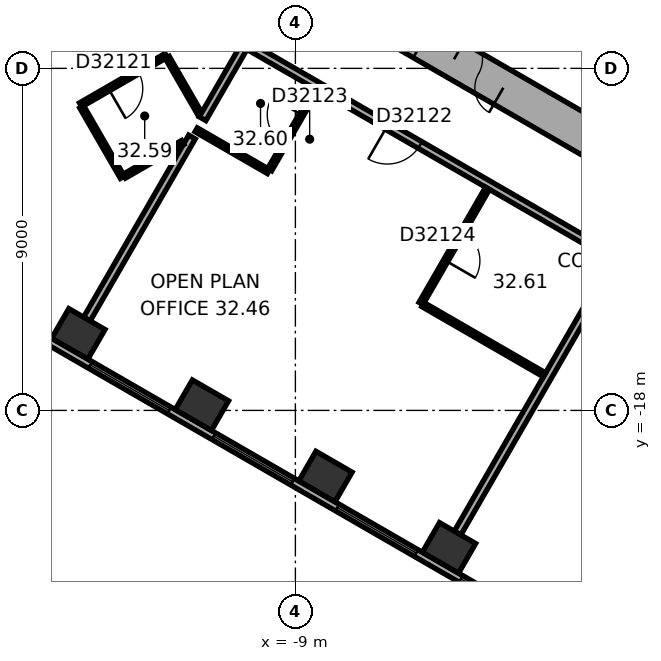
"""IFC4 building model, lengths in metres.
Left out: names, types, materials, properties, quantities, classifications, styles, units other than length and angle.
Written with IfcOpenShell. Run it as: python <this file> out.ifc"""

import sys

from ifc_helpers import new_model, si_unit, direction, frame, frame_2d, origin, origin_2d, place, context, subcontext, project, spatial, rectangle, extrude, element, fill, save


model = new_model("IFC4")
c1 = context("Model", 3, precision=1e-05, world=origin(), true_north=direction((0.0, 1.0)))
c2 = subcontext(c1, "Body", "Model", "MODEL_VIEW")
j1 = project(units=[si_unit("LENGTHUNIT", "METRE"), si_unit("PLANEANGLEUNIT", "RADIAN")], contexts=[c1])
p1 = place(None, origin())
s1 = spatial("IfcSite", under=j1, at=p1, CompositionType="ELEMENT")
p2 = place(p1, origin())
s2 = spatial("IfcBuilding", under=s1, at=p2, CompositionType="ELEMENT")
p3 = place(p2, frame((0.0, 0.0, 131.8)))
s3 = spatial("IfcBuildingStorey", under=s2, at=p3, CompositionType="ELEMENT", Elevation=131.8)
for number, where, z_axis, x_axis in (
    (1, (-14.711, -15.986, 0.0), (0.0, 0.0, 1.0), (0.866, -0.5, 0.0)),
    (2, (-11.46, -17.863, 0.0), (0.0, 0.0, 1.0), (0.866, -0.5, 0.0)),
    (3, (-8.208, -19.74, 0.0), (0.0, 0.0, 1.0), (0.866, -0.5, 0.0)),
    (4, (-4.958, -21.617, 0.0), (0.0, 0.0, 1.0), (0.866, -0.5, 0.0)),
):
    element("IfcColumn", number, at=place(p3, frame(where, z_axis=z_axis, x_axis=x_axis)), inside=s3, PredefinedType="COLUMN", context=c2, shape_type="SweptSolid", body=[
        extrude(rectangle(XDim=1.1, YDim=0.9, at=origin_2d()), origin(), (0.0, 0.0, 1.0), 3.7),
    ])
p4 = place(p3, frame((-10.25, -5.629, 0.0), z_axis=(0.0, 0.0, 1.0), x_axis=(0.866022616891, -0.50000482701, 0.0)))
e5 = element("IfcWall", 5, at=p4, inside=s3, PredefinedType="SHEAR", context=c2, shape_type="SweptSolid", body=[
    extrude(rectangle(XDim=12.125, YDim=1.0, at=frame_2d((6.062, 0.0))), origin(), (0.0, 0.0, 1.0), 3.7),
])
p5 = place(p4, frame((6.262, 0.0, 0.0)))
e6 = element("IfcOpeningElement", 6, at=p5, cuts=e5, PredefinedType="OPENING", context=c2, shape_type="SweptSolid", body=[
    extrude(rectangle(XDim=1.5, YDim=2.1, at=frame_2d((0.75, 1.05))), frame((0.0, 0.51, 0.0), z_axis=(0.0, -1.0, 0.0), x_axis=(1.0, 0.0, 0.0)), (0.0, 0.0, 1.0), 1.02),
])
p6 = place(p4, frame((1.812, 0.0, 0.0)))
e7 = element("IfcOpeningElement", 7, at=p6, cuts=e5, PredefinedType="OPENING", context=c2, shape_type="SweptSolid", body=[
    extrude(rectangle(XDim=0.9, YDim=2.1, at=frame_2d((0.45, 1.05))), frame((0.0, 0.51, 0.0), z_axis=(0.0, -1.0, 0.0), x_axis=(1.0, 0.0, 0.0)), (0.0, 0.0, 1.0), 1.02),
])
p7 = place(p4, frame((4.412, 0.0, 0.0)))
e8 = element("IfcOpeningElement", 8, at=p7, cuts=e5, PredefinedType="OPENING", context=c2, shape_type="SweptSolid", body=[
    extrude(rectangle(XDim=0.9, YDim=2.1, at=frame_2d((0.45, 1.05))), frame((0.0, 0.51, 0.0), z_axis=(0.0, -1.0, 0.0), x_axis=(1.0, 0.0, 0.0)), (0.0, 0.0, 1.0), 1.02),
])
p8 = place(p3, frame((-18.789, -14.267, 0.0), z_axis=(0.0, 0.0, 1.0), x_axis=(0.866023315909, -0.500003616288, 0.0)))
e9 = element("IfcWall", 9, at=p8, inside=s3, PredefinedType="STANDARD", context=c2, shape_type="SweptSolid", body=[
    extrude(rectangle(XDim=20.044, YDim=0.2, at=frame_2d((10.022, 0.0))), origin(), (0.0, 0.0, 1.0), 3.7),
])
p9 = place(p8, frame((1.314, 0.0, 0.9)))
e10 = element("IfcOpeningElement", 10, at=p9, cuts=e9, PredefinedType="OPENING", context=c2, shape_type="SweptSolid", body=[
    extrude(rectangle(XDim=2.4, YDim=2.0, at=frame_2d((1.2, 1.0))), frame((0.0, 0.11, 0.0), z_axis=(0.0, -1.0, 0.0), x_axis=(1.0, 0.0, 0.0)), (0.0, 0.0, 1.0), 0.22),
])
p10 = place(p8, frame((5.069, 0.0, 0.9)))
e11 = element("IfcOpeningElement", 11, at=p10, cuts=e9, PredefinedType="OPENING", context=c2, shape_type="SweptSolid", body=[
    extrude(rectangle(XDim=2.4, YDim=2.0, at=frame_2d((1.2, 1.0))), frame((0.0, 0.11, 0.0), z_axis=(0.0, -1.0, 0.0), x_axis=(1.0, 0.0, 0.0)), (0.0, 0.0, 1.0), 0.22),
])
p11 = place(p8, frame((8.823, 0.0, 0.9)))
e12 = element("IfcOpeningElement", 12, at=p11, cuts=e9, PredefinedType="OPENING", context=c2, shape_type="SweptSolid", body=[
    extrude(rectangle(XDim=2.4, YDim=2.0, at=frame_2d((1.2, 1.0))), frame((0.0, 0.11, 0.0), z_axis=(0.0, -1.0, 0.0), x_axis=(1.0, 0.0, 0.0)), (0.0, 0.0, 1.0), 0.22),
])
p12 = place(p8, frame((12.577, 0.0, 0.9)))
e13 = element("IfcOpeningElement", 13, at=p12, cuts=e9, PredefinedType="OPENING", context=c2, shape_type="SweptSolid", body=[
    extrude(rectangle(XDim=2.4, YDim=2.0, at=frame_2d((1.2, 1.0))), frame((0.0, 0.11, 0.0), z_axis=(0.0, -1.0, 0.0), x_axis=(1.0, 0.0, 0.0)), (0.0, 0.0, 1.0), 0.22),
])
p13 = place(p8, frame((16.331, 0.0, 0.9)))
e14 = element("IfcOpeningElement", 14, at=p13, cuts=e9, PredefinedType="OPENING", context=c2, shape_type="SweptSolid", body=[
    extrude(rectangle(XDim=2.4, YDim=2.0, at=frame_2d((1.2, 1.0))), frame((0.0, 0.11, 0.0), z_axis=(0.0, -1.0, 0.0), x_axis=(1.0, 0.0, 0.0)), (0.0, 0.0, 1.0), 0.22),
])
p14 = place(p3, frame((-14.653, -9.961, 0.0), z_axis=(0.0, 0.0, 1.0), x_axis=(0.866021400173, 0.500006934395, 0.0)))
e15 = element("IfcWall", 15, at=p14, inside=s3, PredefinedType="PARTITIONING", context=c2, shape_type="SweptSolid", body=[
    extrude(rectangle(XDim=2.6, YDim=0.12, at=frame_2d((1.3, 0.0))), origin(), (0.0, 0.0, 1.0), 3.42),
])
p15 = place(p14, frame((0.85, 0.0, 0.0)))
e16 = element("IfcOpeningElement", 16, at=p15, cuts=e15, PredefinedType="OPENING", context=c2, shape_type="SweptSolid", body=[
    extrude(rectangle(XDim=0.9, YDim=2.1, at=frame_2d((0.45, 1.05))), frame((0.0, 0.07, 0.0), z_axis=(0.0, -1.0, 0.0), x_axis=(1.0, 0.0, 0.0)), (0.0, 0.0, 1.0), 0.14),
])
p16 = place(p3, frame((-14.486, -15.597, 0.0), z_axis=(0.0, 0.0, 1.0), x_axis=(0.500003965547, 0.866023114263, 0.0)))
e17 = element("IfcWall", 17, at=p16, inside=s3, PredefinedType="PARTITIONING", context=c2, shape_type="SweptSolid", body=[
    extrude(rectangle(XDim=5.53, YDim=0.2, at=frame_2d((2.765, 0.0))), origin(), (0.0, 0.0, 1.0), 3.42),
])
p17 = place(p3, frame((-13.552, -11.866, 0.0), z_axis=(0.0, 0.0, 1.0), x_axis=(-0.500028586798, 0.86600889856, 0.0)))
e18 = element("IfcWall", 18, at=p17, inside=s3, PredefinedType="PARTITIONING", context=c2, shape_type="SweptSolid", body=[
    extrude(rectangle(XDim=2.14, YDim=0.12, at=frame_2d((1.07, 0.0))), origin(), (0.0, 0.0, 1.0), 3.42),
])
p18 = place(p3, frame((-12.371, -8.713, 0.0), z_axis=(0.0, 0.0, 1.0), x_axis=(0.499910907645, -0.86607683517, 0.0)))
e19 = element("IfcWall", 19, at=p18, inside=s3, PredefinedType="PARTITIONING", context=c2, shape_type="SweptSolid", body=[
    extrude(rectangle(XDim=1.719, YDim=0.12, at=frame_2d((0.86, 0.0))), origin(), (0.0, 0.0, 1.0), 3.42),
])
p19 = place(p3, frame((-11.964, -10.949, 0.0), z_axis=(0.0, 0.0, 1.0), x_axis=(-0.86600680221, -0.500032217487, 0.0)))
e20 = element("IfcWall", 20, at=p19, inside=s3, PredefinedType="PARTITIONING", context=c2, shape_type="SweptSolid", body=[
    extrude(rectangle(XDim=1.774, YDim=0.12, at=frame_2d((0.887, 0.0))), origin(), (0.0, 0.0, 1.0), 3.42),
])
p20 = place(p3, frame((-11.442, -10.325, 0.0), z_axis=(0.0, 0.0, 1.0), x_axis=(0.500012369163, 0.866018262327, 0.0)))
e21 = element("IfcWall", 21, at=p20, inside=s3, PredefinedType="PARTITIONING", context=c2, shape_type="SweptSolid", body=[
    extrude(rectangle(XDim=2.163, YDim=0.2, at=frame_2d((1.081, 0.0))), origin(), (0.0, 0.0, 1.0), 3.42),
])
p21 = place(p3, frame((-11.415, -7.728, 0.0), z_axis=(0.0, 0.0, 1.0), x_axis=(0.866022749921, -0.500004596598, 0.0)))
e22 = element("IfcWall", 22, at=p21, inside=s3, PredefinedType="PARTITIONING", context=c2, shape_type="SweptSolid", body=[
    extrude(rectangle(XDim=12.084, YDim=0.2, at=frame_2d((6.042, 0.0))), origin(), (0.0, 0.0, 1.0), 3.42),
])
p22 = place(p21, frame((5.58, 0.0, 0.0)))
e23 = element("IfcOpeningElement", 23, at=p22, cuts=e22, PredefinedType="OPENING", context=c2, shape_type="SweptSolid", body=[
    extrude(rectangle(XDim=1.0, YDim=2.1, at=frame_2d((0.5, 1.05))), frame((0.0, 0.11, 0.0), z_axis=(0.0, -1.0, 0.0), x_axis=(1.0, 0.0, 0.0)), (0.0, 0.0, 1.0), 0.22),
])
p23 = place(p3, frame((-9.706, -11.717, 0.0), z_axis=(0.0, 0.0, 1.0), x_axis=(-0.86598042715, 0.500077893725, 0.0)))
e24 = element("IfcWall", 24, at=p23, inside=s3, PredefinedType="PARTITIONING", context=c2, shape_type="SweptSolid", body=[
    extrude(rectangle(XDim=2.2, YDim=0.12, at=frame_2d((1.1, 0.0))), origin(), (0.0, 0.0, 1.0), 3.42),
])
p24 = place(p3, frame((-8.456, -9.552, 0.0), z_axis=(0.0, 0.0, 1.0), x_axis=(-0.500002508028, -0.866023955769, 0.0)))
e25 = element("IfcWall", 25, at=p24, inside=s3, PredefinedType="PARTITIONING", context=c2, shape_type="SweptSolid", body=[
    extrude(rectangle(XDim=2.44, YDim=0.12, at=frame_2d((1.22, 0.0))), origin(), (0.0, 0.0, 1.0), 3.42),
])
p25 = place(p24, frame((0.77, 0.0, 0.0)))
e26 = element("IfcOpeningElement", 26, at=p25, cuts=e25, PredefinedType="OPENING", context=c2, shape_type="SweptSolid", body=[
    extrude(rectangle(XDim=0.9, YDim=2.1, at=frame_2d((0.45, 1.05))), frame((0.0, 0.07, 0.0), z_axis=(0.0, -1.0, 0.0), x_axis=(1.0, 0.0, 0.0)), (0.0, 0.0, 1.0), 0.14),
])
p26 = place(p3, frame((-5.695, -15.188, 0.0), z_axis=(0.0, 0.0, 1.0), x_axis=(0.500010275428, 0.866019471182, 0.0)))
e27 = element("IfcWall", 27, at=p26, inside=s3, PredefinedType="PARTITIONING", context=c2, shape_type="SweptSolid", body=[
    extrude(rectangle(XDim=3.5, YDim=0.12, at=frame_2d((1.75, 0.0))), origin(), (0.0, 0.0, 1.0), 3.42),
])
p27 = place(p26, frame((1.3, 0.0, 0.0)))
e28 = element("IfcOpeningElement", 28, at=p27, cuts=e27, PredefinedType="OPENING", context=c2, shape_type="SweptSolid", body=[
    extrude(rectangle(XDim=0.9, YDim=2.1, at=frame_2d((0.45, 1.05))), frame((0.0, 0.07, 0.0), z_axis=(0.0, -1.0, 0.0), x_axis=(1.0, 0.0, 0.0)), (0.0, 0.0, 1.0), 0.14),
])
p28 = place(p3, frame((-4.732, -21.228, 0.0), z_axis=(0.0, 0.0, 1.0), x_axis=(0.500000843414, 0.866024916838, 0.0)))
e29 = element("IfcWall", 29, at=p28, inside=s3, PredefinedType="PARTITIONING", context=c2, shape_type="SweptSolid", body=[
    extrude(rectangle(XDim=8.452, YDim=0.2, at=frame_2d((4.226, 0.0))), origin(), (0.0, 0.0, 1.0), 3.42),
])
p29 = place(p3, frame((-2.444, -17.064, 0.0), z_axis=(0.0, 0.0, 1.0), x_axis=(-0.86602156466, 0.500006649499, 0.0)))
e30 = element("IfcWall", 30, at=p29, inside=s3, PredefinedType="PARTITIONING", context=c2, shape_type="SweptSolid", body=[
    extrude(rectangle(XDim=3.693, YDim=0.12, at=frame_2d((1.847, 0.0))), origin(), (0.0, 0.0, 1.0), 3.42),
])
p30 = place(p10, origin())
e31 = element("IfcWindow", 31, at=p30, inside=s3, PartitioningType="SINGLE_PANEL", PredefinedType="WINDOW", context=c2, shape_type="SweptSolid", body=[
    extrude(rectangle(XDim=2.4, YDim=2.0, at=frame_2d((1.2, 1.0))), frame((0.0, 0.03, 0.0), z_axis=(0.0, -1.0, 0.0), x_axis=(1.0, 0.0, 0.0)), (0.0, 0.0, 1.0), 0.06),
])
fill(e11, e31)
p31 = place(p11, origin())
e32 = element("IfcWindow", 32, at=p31, inside=s3, PartitioningType="SINGLE_PANEL", PredefinedType="WINDOW", context=c2, shape_type="SweptSolid", body=[
    extrude(rectangle(XDim=2.4, YDim=2.0, at=frame_2d((1.2, 1.0))), frame((0.0, 0.03, 0.0), z_axis=(0.0, -1.0, 0.0), x_axis=(1.0, 0.0, 0.0)), (0.0, 0.0, 1.0), 0.06),
])
fill(e12, e32)
p32 = place(p12, origin())
e33 = element("IfcWindow", 33, at=p32, inside=s3, PartitioningType="SINGLE_PANEL", PredefinedType="WINDOW", context=c2, shape_type="SweptSolid", body=[
    extrude(rectangle(XDim=2.4, YDim=2.0, at=frame_2d((1.2, 1.0))), frame((0.0, 0.03, 0.0), z_axis=(0.0, -1.0, 0.0), x_axis=(1.0, 0.0, 0.0)), (0.0, 0.0, 1.0), 0.06),
])
fill(e13, e33)
p33 = place(p13, origin())
e34 = element("IfcWindow", 34, at=p33, inside=s3, PartitioningType="SINGLE_PANEL", PredefinedType="WINDOW", context=c2, shape_type="SweptSolid", body=[
    extrude(rectangle(XDim=2.4, YDim=2.0, at=frame_2d((1.2, 1.0))), frame((0.0, 0.03, 0.0), z_axis=(0.0, -1.0, 0.0), x_axis=(1.0, 0.0, 0.0)), (0.0, 0.0, 1.0), 0.06),
])
fill(e14, e34)
p34 = place(p5, origin())
e35 = element("IfcDoor", 35, at=p34, inside=s3, OperationType="DOUBLE_DOOR_SINGLE_SWING", PredefinedType="DOOR", context=c2, shape_type="SweptSolid", body=[
    extrude(rectangle(XDim=1.5, YDim=2.1, at=frame_2d((0.75, 1.05))), frame((0.0, 0.025, 0.0), z_axis=(0.0, -1.0, 0.0), x_axis=(1.0, 0.0, 0.0)), (0.0, 0.0, 1.0), 0.05),
])
fill(e6, e35)
p35 = place(p15, origin())
e36 = element("IfcDoor", 36, at=p35, inside=s3, OperationType="SINGLE_SWING_LEFT", PredefinedType="DOOR", context=c2, shape_type="SweptSolid", body=[
    extrude(rectangle(XDim=0.9, YDim=2.1, at=frame_2d((0.45, 1.05))), frame((0.0, 0.025, 0.0), z_axis=(0.0, -1.0, 0.0), x_axis=(1.0, 0.0, 0.0)), (0.0, 0.0, 1.0), 0.05),
])
fill(e16, e36)
p36 = place(p22, origin())
e37 = element("IfcDoor", 37, at=p36, inside=s3, OperationType="SINGLE_SWING_LEFT", PredefinedType="DOOR", context=c2, shape_type="SweptSolid", body=[
    extrude(rectangle(XDim=1.0, YDim=2.1, at=frame_2d((0.5, 1.05))), frame((0.0, 0.025, 0.0), z_axis=(0.0, -1.0, 0.0), x_axis=(1.0, 0.0, 0.0)), (0.0, 0.0, 1.0), 0.05),
])
fill(e23, e37)
p37 = place(p25, origin())
e38 = element("IfcDoor", 38, at=p37, inside=s3, OperationType="SINGLE_SWING_LEFT", PredefinedType="DOOR", context=c2, shape_type="SweptSolid", body=[
    extrude(rectangle(XDim=0.9, YDim=2.1, at=frame_2d((0.45, 1.05))), frame((0.0, 0.025, 0.0), z_axis=(0.0, -1.0, 0.0), x_axis=(1.0, 0.0, 0.0)), (0.0, 0.0, 1.0), 0.05),
])
fill(e26, e38)
p38 = place(p27, origin())
e39 = element("IfcDoor", 39, at=p38, inside=s3, OperationType="SINGLE_SWING_LEFT", PredefinedType="DOOR", context=c2, shape_type="SweptSolid", body=[
    extrude(rectangle(XDim=0.9, YDim=2.1, at=frame_2d((0.45, 1.05))), frame((0.0, 0.025, 0.0), z_axis=(0.0, -1.0, 0.0), x_axis=(1.0, 0.0, 0.0)), (0.0, 0.0, 1.0), 0.05),
])
fill(e28, e39)
save(model, sys.argv[1])
